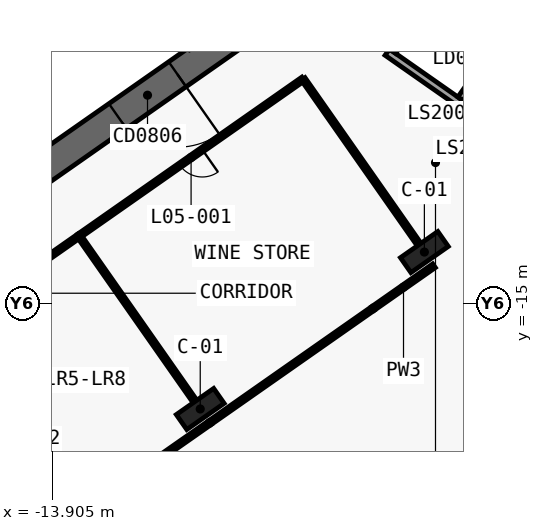
"""IFC4 building model, lengths in metres.
Left out: names, types, materials, properties, quantities, classifications, styles, units other than length and angle.
Written with IfcOpenShell. Run it as: python <this file> out.ifc"""

import sys

from ifc_helpers import new_model, si_unit, direction, frame, frame_2d, origin, origin_2d, place, context, subcontext, project, spatial, polyline, rectangle, outline, extrude, element, fill, save


model = new_model("IFC4")
c1 = context("Model", 3, precision=1e-05, world=origin(), true_north=direction((0.0, 1.0)))
c2 = subcontext(c1, "Body", "Model", "MODEL_VIEW")
j1 = project(units=[si_unit("LENGTHUNIT", "METRE"), si_unit("PLANEANGLEUNIT", "RADIAN")], contexts=[c1])
p1 = place(None, origin())
s1 = spatial("IfcSite", under=j1, at=p1, CompositionType="ELEMENT")
p2 = place(p1, origin())
s2 = spatial("IfcBuilding", under=s1, at=p2, CompositionType="ELEMENT")
p3 = place(p2, frame((0.0, 0.0, 37.5)))
s3 = spatial("IfcBuildingStorey", under=s2, at=p3, CompositionType="ELEMENT", Elevation=37.5)
p4 = place(p3, frame((0.037, 11.867, 0.0), z_axis=(0.0, 0.0, 1.0), x_axis=(-0.819155306259, -0.573571777746, 0.0)))
e1 = element("IfcWall", 1, at=p4, inside=s3, PredefinedType="SHEAR", context=c2, shape_type="SweptSolid", body=[
    extrude(outline(polyline([(33.837, 0.5), (0.7, 0.5), (0.0, -0.5), (33.837, -0.5), (33.837, 0.5)])), origin(), (0.0, 0.0, 1.0), 5.5),
])
p5 = place(p3, frame((0.037, -0.585, 0.0), z_axis=(0.0, 0.0, 1.0), x_axis=(-0.819157152511, -0.573569140985, 0.0)))
e2 = element("IfcWall", 2, at=p5, inside=s3, PredefinedType="SHEAR", context=c2, shape_type="SweptSolid", body=[
    extrude(outline(polyline([(26.695, 0.5), (0.7, 0.5), (0.0, -0.5), (26.695, -0.5), (26.695, 0.5)])), origin(), (0.0, 0.0, 1.0), 5.5),
])
p6 = place(p5, frame((2.995, 0.0, 0.0)))
e3 = element("IfcOpeningElement", 3, at=p6, cuts=e2, PredefinedType="OPENING", context=c2, shape_type="SweptSolid", body=[
    extrude(rectangle(XDim=2.4, YDim=2.1, at=frame_2d((1.2, 1.05))), frame((0.0, 0.51, 0.0), z_axis=(0.0, -1.0, 0.0), x_axis=(1.0, 0.0, 0.0)), (0.0, 0.0, 1.0), 1.02),
])
p7 = place(p5, frame((11.995, 0.0, 0.0)))
e4 = element("IfcOpeningElement", 4, at=p7, cuts=e2, PredefinedType="OPENING", context=c2, shape_type="SweptSolid", body=[
    extrude(rectangle(XDim=2.4, YDim=2.1, at=frame_2d((1.2, 1.05))), frame((0.0, 0.51, 0.0), z_axis=(0.0, -1.0, 0.0), x_axis=(1.0, 0.0, 0.0)), (0.0, 0.0, 1.0), 1.02),
])
p8 = place(p3, frame((-2.638, 3.768, 0.0), z_axis=(0.0, 0.0, 1.0), x_axis=(-0.819148977158, -0.573580816643, 0.0)))
e5 = element("IfcWall", 5, at=p8, inside=s3, PredefinedType="SHEAR", context=c2, shape_type="SweptSolid", body=[
    extrude(outline(polyline([(26.0, 0.25), (0.0, 0.25), (0.0, -0.25), (26.0, -0.25), (26.0, 0.25)])), origin(), (0.0, 0.0, 1.0), 5.5),
])
p9 = place(p8, frame((1.169, 0.0, 0.0)))
e6 = element("IfcOpeningElement", 6, at=p9, cuts=e5, PredefinedType="OPENING", context=c2, shape_type="SweptSolid", body=[
    extrude(rectangle(XDim=1.1, YDim=2.1, at=frame_2d((0.55, 1.05))), frame((0.0, 0.26, 0.0), z_axis=(0.0, -1.0, 0.0), x_axis=(1.0, 0.0, 0.0)), (0.0, 0.0, 1.0), 0.52),
])
p10 = place(p8, frame((3.206, 0.0, 0.0)))
e7 = element("IfcOpeningElement", 7, at=p10, cuts=e5, PredefinedType="OPENING", context=c2, shape_type="SweptSolid", body=[
    extrude(rectangle(XDim=1.1, YDim=2.1, at=frame_2d((0.55, 1.05))), frame((0.0, 0.26, 0.0), z_axis=(0.0, -1.0, 0.0), x_axis=(1.0, 0.0, 0.0)), (0.0, 0.0, 1.0), 0.52),
])
p11 = place(p8, frame((5.244, 0.0, 0.0)))
e8 = element("IfcOpeningElement", 8, at=p11, cuts=e5, PredefinedType="OPENING", context=c2, shape_type="SweptSolid", body=[
    extrude(rectangle(XDim=1.1, YDim=2.1, at=frame_2d((0.55, 1.05))), frame((0.0, 0.26, 0.0), z_axis=(0.0, -1.0, 0.0), x_axis=(1.0, 0.0, 0.0)), (0.0, 0.0, 1.0), 0.52),
])
p12 = place(p8, frame((7.281, 0.0, 0.0)))
e9 = element("IfcOpeningElement", 9, at=p12, cuts=e5, PredefinedType="OPENING", context=c2, shape_type="SweptSolid", body=[
    extrude(rectangle(XDim=1.1, YDim=2.1, at=frame_2d((0.55, 1.05))), frame((0.0, 0.26, 0.0), z_axis=(0.0, -1.0, 0.0), x_axis=(1.0, 0.0, 0.0)), (0.0, 0.0, 1.0), 0.52),
])
p13 = place(p8, frame((9.688, 0.0, 0.0)))
e10 = element("IfcOpeningElement", 10, at=p13, cuts=e5, PredefinedType="OPENING", context=c2, shape_type="SweptSolid", body=[
    extrude(rectangle(XDim=1.1, YDim=2.1, at=frame_2d((0.55, 1.05))), frame((0.0, 0.26, 0.0), z_axis=(0.0, -1.0, 0.0), x_axis=(1.0, 0.0, 0.0)), (0.0, 0.0, 1.0), 0.52),
])
p14 = place(p8, frame((11.863, 0.0, 0.0)))
e11 = element("IfcOpeningElement", 11, at=p14, cuts=e5, PredefinedType="OPENING", context=c2, shape_type="SweptSolid", body=[
    extrude(rectangle(XDim=1.1, YDim=2.1, at=frame_2d((0.55, 1.05))), frame((0.0, 0.26, 0.0), z_axis=(0.0, -1.0, 0.0), x_axis=(1.0, 0.0, 0.0)), (0.0, 0.0, 1.0), 0.52),
])
p15 = place(p8, frame((14.038, 0.0, 0.0)))
e12 = element("IfcOpeningElement", 12, at=p15, cuts=e5, PredefinedType="OPENING", context=c2, shape_type="SweptSolid", body=[
    extrude(rectangle(XDim=1.1, YDim=2.1, at=frame_2d((0.55, 1.05))), frame((0.0, 0.26, 0.0), z_axis=(0.0, -1.0, 0.0), x_axis=(1.0, 0.0, 0.0)), (0.0, 0.0, 1.0), 0.52),
])
p16 = place(p8, frame((16.212, 0.0, 0.0)))
e13 = element("IfcOpeningElement", 13, at=p16, cuts=e5, PredefinedType="OPENING", context=c2, shape_type="SweptSolid", body=[
    extrude(rectangle(XDim=1.1, YDim=2.1, at=frame_2d((0.55, 1.05))), frame((0.0, 0.26, 0.0), z_axis=(0.0, -1.0, 0.0), x_axis=(1.0, 0.0, 0.0)), (0.0, 0.0, 1.0), 0.52),
])
for number, where, z_axis, x_axis in (
    (14, (-1.665, -13.313, 0.0), (0.0, 0.0, 1.0), (-0.819, -0.574, 0.0)),
    (15, (-9.038, -18.475, 0.0), (0.0, 0.0, 1.0), (-0.819, -0.574, 0.0)),
):
    element("IfcColumn", number, at=place(p3, frame(where, z_axis=z_axis, x_axis=x_axis)), inside=s3, PredefinedType="COLUMN", context=c2, shape_type="SweptSolid", body=[
        extrude(rectangle(XDim=1.5, YDim=0.6, at=origin_2d()), origin(), (0.0, 0.0, 1.0), 5.5),
    ])
p17 = place(p3, frame((-2.887, -6.738, 0.0), z_axis=(0.0, 0.0, 1.0), x_axis=(0.819150280716, -0.573578954985, 0.0)))
e16 = element("IfcWall", 16, at=p17, inside=s3, PredefinedType="SOLIDWALL", context=c2, shape_type="SweptSolid", body=[
    extrude(rectangle(XDim=11.1, YDim=0.25, at=frame_2d((5.55, 0.0))), origin(), (0.0, 0.0, 1.0), 5.5),
])
p18 = place(p3, frame((-1.481, -4.731, 0.0), z_axis=(0.0, 0.0, 1.0), x_axis=(0.819150280716, -0.573578954985, 0.0)))
e17 = element("IfcWall", 17, at=p18, inside=s3, PredefinedType="SOLIDWALL", context=c2, shape_type="SweptSolid", body=[
    extrude(rectangle(XDim=11.1, YDim=0.25, at=frame_2d((5.55, 0.0))), origin(), (0.0, 0.0, 1.0), 5.5),
])
p19 = place(p18, frame((0.8, 0.0, 0.0)))
e18 = element("IfcOpeningElement", 18, at=p19, cuts=e17, PredefinedType="OPENING", context=c2, shape_type="SweptSolid", body=[
    extrude(rectangle(XDim=1.4, YDim=2.1, at=frame_2d((0.7, 1.05))), frame((0.0, 0.135, 0.0), z_axis=(0.0, -1.0, 0.0), x_axis=(1.0, 0.0, 0.0)), (0.0, 0.0, 1.0), 0.27),
])
p20 = place(p18, frame((3.5, 0.0, 0.0)))
e19 = element("IfcOpeningElement", 19, at=p20, cuts=e17, PredefinedType="OPENING", context=c2, shape_type="SweptSolid", body=[
    extrude(rectangle(XDim=1.4, YDim=2.1, at=frame_2d((0.7, 1.05))), frame((0.0, 0.135, 0.0), z_axis=(0.0, -1.0, 0.0), x_axis=(1.0, 0.0, 0.0)), (0.0, 0.0, 1.0), 0.27),
])
p21 = place(p18, frame((6.2, 0.0, 0.0)))
e20 = element("IfcOpeningElement", 20, at=p21, cuts=e17, PredefinedType="OPENING", context=c2, shape_type="SweptSolid", body=[
    extrude(rectangle(XDim=1.4, YDim=2.1, at=frame_2d((0.7, 1.05))), frame((0.0, 0.135, 0.0), z_axis=(0.0, -1.0, 0.0), x_axis=(1.0, 0.0, 0.0)), (0.0, 0.0, 1.0), 0.27),
])
p22 = place(p18, frame((8.9, 0.0, 0.0)))
e21 = element("IfcOpeningElement", 21, at=p22, cuts=e17, PredefinedType="OPENING", context=c2, shape_type="SweptSolid", body=[
    extrude(rectangle(XDim=1.4, YDim=2.1, at=frame_2d((0.7, 1.05))), frame((0.0, 0.135, 0.0), z_axis=(0.0, -1.0, 0.0), x_axis=(1.0, 0.0, 0.0)), (0.0, 0.0, 1.0), 0.27),
])
p23 = place(p3, frame((-2.713, -6.707, 0.0), z_axis=(0.0, 0.0, 1.0), x_axis=(0.573581496053, 0.819148501424, 0.0)))
e22 = element("IfcWall", 22, at=p23, inside=s3, PredefinedType="SOLIDWALL", context=c2, shape_type="SweptSolid", body=[
    extrude(rectangle(XDim=2.2, YDim=0.25, at=frame_2d((1.1, 0.0))), origin(), (0.0, 0.0, 1.0), 5.5),
])
p24 = place(p3, frame((-0.48, -8.27, 0.0), z_axis=(0.0, 0.0, 1.0), x_axis=(0.573633636671, 0.819111989218, 0.0)))
e23 = element("IfcWall", 23, at=p24, inside=s3, PredefinedType="SOLIDWALL", context=c2, shape_type="SweptSolid", body=[
    extrude(rectangle(XDim=2.2, YDim=0.2, at=frame_2d((1.1, 0.0))), origin(), (0.0, 0.0, 1.0), 5.5),
])
p25 = place(p3, frame((-5.652, -7.62, 0.0), z_axis=(0.0, 0.0, 1.0), x_axis=(-0.81915291695, -0.57357519006, 0.0)))
e24 = element("IfcWall", 24, at=p25, inside=s3, PredefinedType="PARTITIONING", context=c2, shape_type="SweptSolid", body=[
    extrude(rectangle(XDim=9.002, YDim=0.15, at=frame_2d((4.501, 0.0))), origin(), (0.0, 0.0, 1.0), 3.68),
])
p26 = place(p25, frame((4.051, 0.0, 0.0)))
e25 = element("IfcOpeningElement", 25, at=p26, cuts=e24, PredefinedType="OPENING", context=c2, shape_type="SweptSolid", body=[
    extrude(rectangle(XDim=0.9, YDim=2.1, at=frame_2d((0.45, 1.05))), frame((0.0, 0.085, 0.0), z_axis=(0.0, -1.0, 0.0), x_axis=(1.0, 0.0, 0.0)), (0.0, 0.0, 1.0), 0.17),
])
p27 = place(p3, frame((-13.022, -12.781, 0.0), z_axis=(0.0, 0.0, 1.0), x_axis=(-0.819154688631, -0.57357265982, 0.0)))
e26 = element("IfcWall", 26, at=p27, inside=s3, PredefinedType="PARTITIONING", context=c2, shape_type="SweptSolid", body=[
    extrude(rectangle(XDim=30.002, YDim=0.15, at=frame_2d((15.001, 0.0))), origin(), (0.0, 0.0, 1.0), 3.68),
])
p28 = place(p27, frame((14.551, 0.0, 0.0)))
e27 = element("IfcOpeningElement", 27, at=p28, cuts=e26, PredefinedType="OPENING", context=c2, shape_type="SweptSolid", body=[
    extrude(rectangle(XDim=0.9, YDim=2.1, at=frame_2d((0.45, 1.05))), frame((0.0, 0.085, 0.0), z_axis=(0.0, -1.0, 0.0), x_axis=(1.0, 0.0, 0.0)), (0.0, 0.0, 1.0), 0.17),
])
p29 = place(p3, frame((-8.723, -18.927, 0.0), z_axis=(0.0, 0.0, 1.0), x_axis=(0.81913387212, 0.573602388024, 0.0)))
e28 = element("IfcWall", 28, at=p29, inside=s3, PredefinedType="PARTITIONING", context=c2, shape_type="SweptSolid", body=[
    extrude(rectangle(XDim=6.552, YDim=0.15, at=frame_2d((3.276, 0.0))), origin(), (0.0, 0.0, 1.0), 5.1),
])
p30 = place(p3, frame((-30.839, -34.413, 0.0), z_axis=(0.0, 0.0, 1.0), x_axis=(0.819150779762, 0.573578242279, 0.0)))
e29 = element("IfcWall", 29, at=p30, inside=s3, PredefinedType="PARTITIONING", context=c2, shape_type="SweptSolid", body=[
    extrude(rectangle(XDim=27.002, YDim=0.15, at=frame_2d((13.501, 0.0))), origin(), (0.0, 0.0, 1.0), 4.08),
])
p31 = place(p3, frame((-3.355, -15.169, 0.0), z_axis=(0.0, 0.0, 1.0), x_axis=(0.819157023945, 0.573569324599, 0.0)))
e30 = element("IfcWall", 30, at=p31, inside=s3, PredefinedType="PARTITIONING", context=c2, shape_type="SweptSolid", body=[
    extrude(rectangle(XDim=2.45, YDim=0.15, at=frame_2d((1.225, 0.0))), origin(), (0.0, 0.0, 1.0), 5.1),
])
p32 = place(p3, frame((-1.849, -13.051, 0.0), z_axis=(0.0, 0.0, 1.0), x_axis=(-0.573575988258, 0.819152358047, 0.0)))
e31 = element("IfcWall", 31, at=p32, inside=s3, PredefinedType="PARTITIONING", context=c2, shape_type="SweptSolid", body=[
    extrude(rectangle(XDim=6.632, YDim=0.15, at=frame_2d((3.316, 0.0))), origin(), (0.0, 0.0, 1.0), 3.68),
])
p33 = place(p3, frame((-9.221, -18.213, 0.0), z_axis=(0.0, 0.0, 1.0), x_axis=(-0.573556251799, 0.819166177294, 0.0)))
e32 = element("IfcWall", 32, at=p33, inside=s3, PredefinedType="PARTITIONING", context=c2, shape_type="SweptSolid", body=[
    extrude(rectangle(XDim=6.63, YDim=0.15, at=frame_2d((3.315, 0.0))), origin(), (0.0, 0.0, 1.0), 3.68),
])
p34 = place(p7, origin())
e33 = element("IfcDoor", 33, at=p34, inside=s3, OperationType="DOUBLE_DOOR_SINGLE_SWING", PredefinedType="DOOR", context=c2, shape_type="SweptSolid", body=[
    extrude(rectangle(XDim=2.4, YDim=2.1, at=frame_2d((1.2, 1.05))), frame((0.0, 0.025, 0.0), z_axis=(0.0, -1.0, 0.0), x_axis=(1.0, 0.0, 0.0)), (0.0, 0.0, 1.0), 0.05),
])
fill(e4, e33)
p35 = place(p26, origin())
e34 = element("IfcDoor", 34, at=p35, inside=s3, OperationType="SINGLE_SWING_RIGHT", PredefinedType="DOOR", context=c2, shape_type="SweptSolid", body=[
    extrude(rectangle(XDim=0.9, YDim=2.1, at=frame_2d((0.45, 1.05))), frame((0.0, 0.025, 0.0), z_axis=(0.0, -1.0, 0.0), x_axis=(1.0, 0.0, 0.0)), (0.0, 0.0, 1.0), 0.05),
])
fill(e25, e34)
save(model, sys.argv[1])
